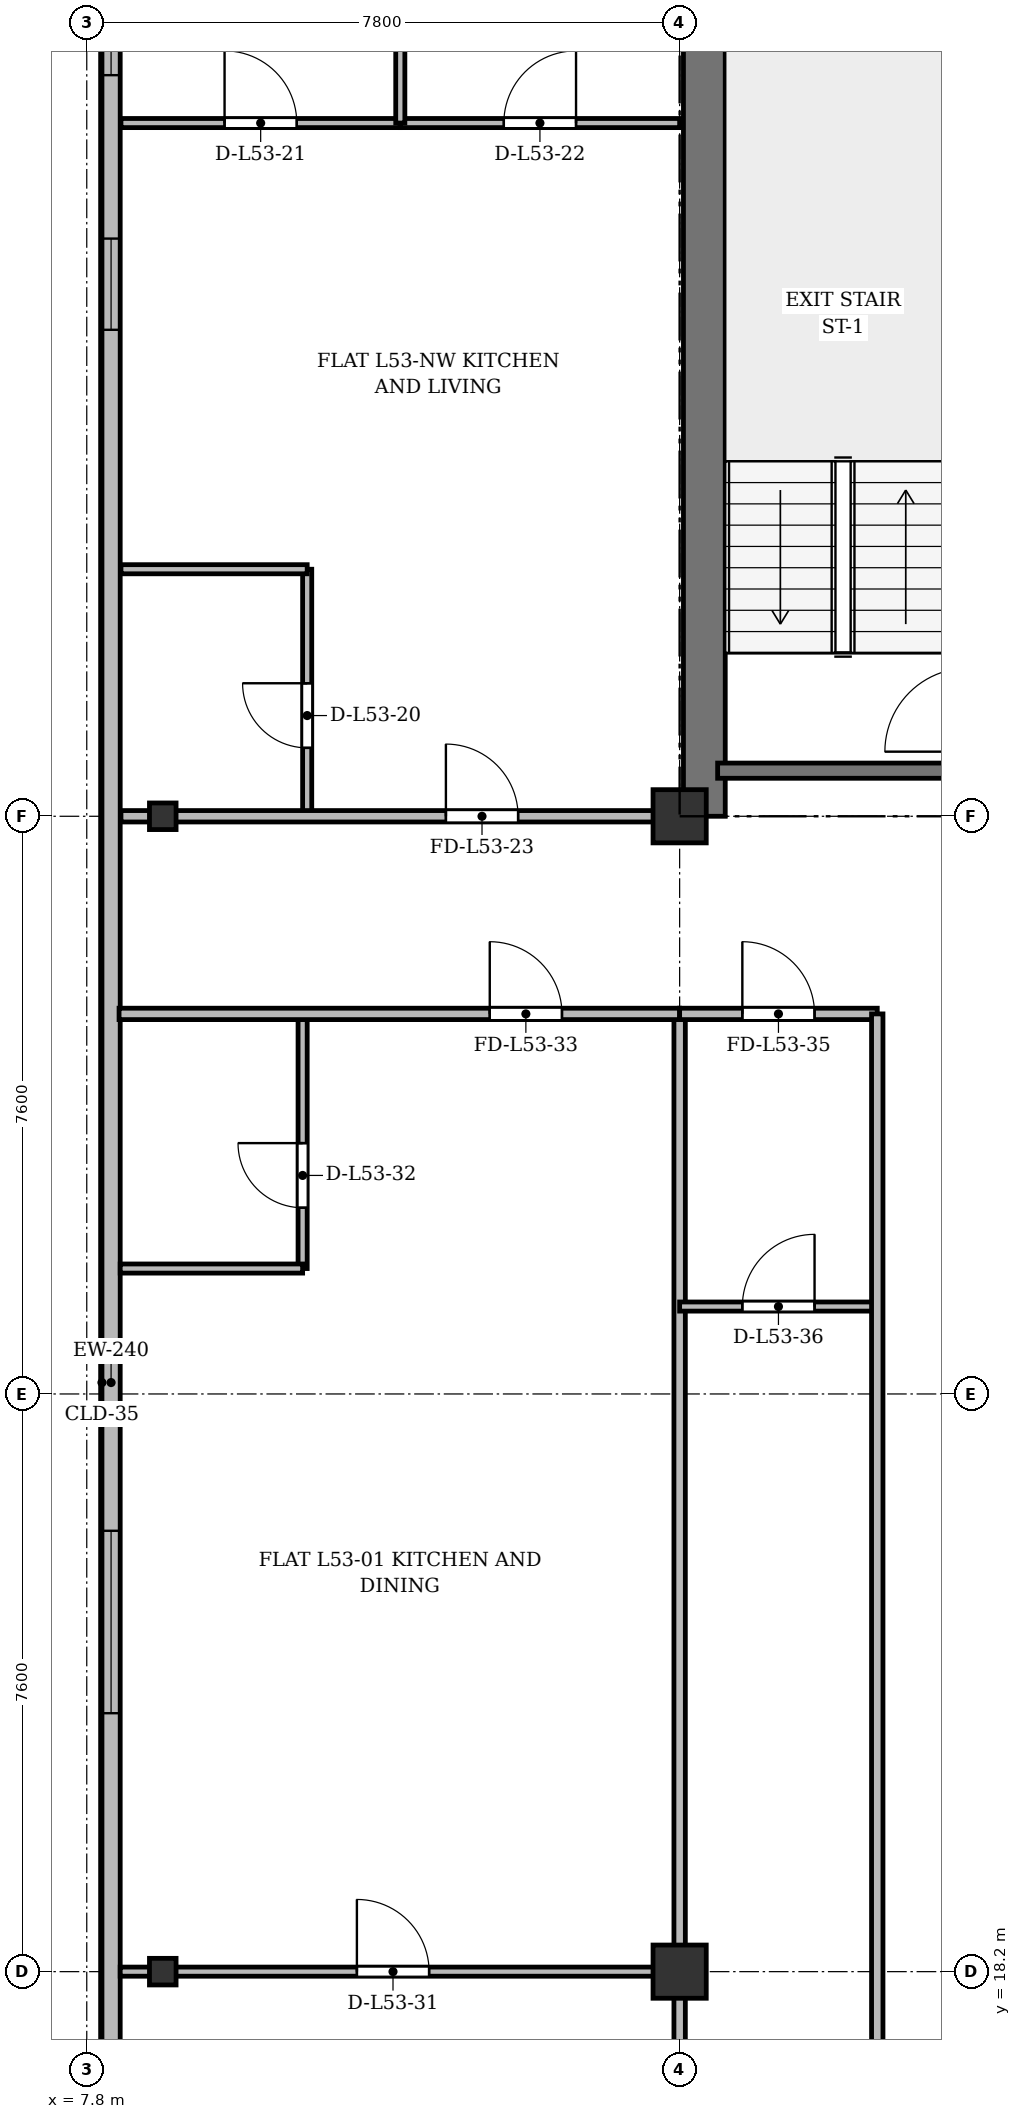
"""IFC4 building model, lengths in metres.
Left out: names, types, materials, properties, quantities, classifications, styles, units other than length and angle.
Written with IfcOpenShell. Run it as: python <this file> out.ifc"""

import sys

from ifc_helpers import new_model, si_unit, direction, frame, frame_2d, origin, origin_2d, place, context, subcontext, project, spatial, rectangle, i_section, extrude, source, transform, mapped, element, fill, save


model = new_model("IFC4")
c1 = context("Model", 3, precision=1e-05, world=origin(), true_north=direction((0.0, 1.0)))
c2 = subcontext(c1, "Body", "Model", "MODEL_VIEW")
j1 = project(units=[si_unit("LENGTHUNIT", "METRE"), si_unit("PLANEANGLEUNIT", "RADIAN")], contexts=[c1])
p1 = place(None, origin())
s1 = spatial("IfcSite", under=j1, at=p1, CompositionType="ELEMENT")
p2 = place(p1, origin())
s2 = spatial("IfcBuilding", under=s1, at=p2, CompositionType="ELEMENT")
p3 = place(p2, frame((0.0, 0.0, 204.9)))
s3 = spatial("IfcBuildingStorey", under=s2, at=p3, CompositionType="ELEMENT", Elevation=204.9)
m1 = source(origin(), c2, "Body", "SweptSolid", [
    extrude(i_section(OverallWidth=0.35, OverallDepth=0.35, WebThickness=0.018, FlangeThickness=0.028, at=origin_2d()), origin(), (0.0, 0.0, 1.0), 3.6),
])
for number, where, z_axis, x_axis in (
    (1, (8.8, 18.2, 0.0), (0.0, 0.0, 1.0), (1.0, 0.0, 0.0)),
    (2, (8.8, 33.4, 0.0), (0.0, 0.0, 1.0), (1.0, 0.0, 0.0)),
):
    element("IfcColumn", number, at=place(p3, frame(where, z_axis=z_axis, x_axis=x_axis)), inside=s3, PredefinedType="COLUMN", context=c2, shape_type="MappedRepresentation", body=[
        mapped(m1, transform((0.0, 0.0, 0.0), x_axis=(1.0, 0.0, 0.0), y_axis=(0.0, 1.0, 0.0), z_axis=(0.0, 0.0, 1.0), scale=1.0)),
    ])
m2 = source(origin(), c2, "Body", "SweptSolid", [
    extrude(rectangle(XDim=0.7, YDim=0.7, at=origin_2d()), origin(), (0.0, 0.0, 1.0), 3.6),
])
for number, where, z_axis, x_axis in (
    (3, (15.6, 18.2, 0.0), (0.0, 0.0, 1.0), (1.0, 0.0, 0.0)),
    (4, (15.6, 33.4, 0.0), (0.0, 0.0, 1.0), (1.0, 0.0, 0.0)),
):
    element("IfcColumn", number, at=place(p3, frame(where, z_axis=z_axis, x_axis=x_axis)), inside=s3, PredefinedType="COLUMN", context=c2, shape_type="MappedRepresentation", body=[
        mapped(m2, transform((0.0, 0.0, 0.0), x_axis=(1.0, 0.0, 0.0), y_axis=(0.0, 1.0, 0.0), z_axis=(0.0, 0.0, 1.0), scale=1.0)),
    ])
p4 = place(p3, frame((8.12, 6.4, 0.0), z_axis=(0.0, 0.0, 1.0), x_axis=(0.0, 1.0, 0.0)))
e5 = element("IfcWall", 5, at=p4, inside=s3, PredefinedType="SOLIDWALL", context=c2, shape_type="SweptSolid", body=[
    extrude(rectangle(XDim=39.1, YDim=0.24, at=frame_2d((19.55, 0.0))), origin(), (0.0, 0.0, 1.0), 3.36),
])
p5 = place(p4, frame((1.45, 0.0, 0.92)))
e6 = element("IfcOpeningElement", 6, at=p5, cuts=e5, PredefinedType="OPENING", context=c2, shape_type="SweptSolid", body=[
    extrude(rectangle(XDim=1.2, YDim=1.65, at=frame_2d((0.6, 0.825))), frame((0.0, 0.13, 0.0), z_axis=(0.0, -1.0, 0.0), x_axis=(1.0, 0.0, 0.0)), (0.0, 0.0, 1.0), 0.26),
])
p6 = place(p4, frame((3.8, 0.0, 0.92)))
e7 = element("IfcOpeningElement", 7, at=p6, cuts=e5, PredefinedType="OPENING", context=c2, shape_type="SweptSolid", body=[
    extrude(rectangle(XDim=2.4, YDim=2.1, at=frame_2d((1.2, 1.05))), frame((0.0, 0.13, 0.0), z_axis=(0.0, -1.0, 0.0), x_axis=(1.0, 0.0, 0.0)), (0.0, 0.0, 1.0), 0.26),
])
p7 = place(p4, frame((8.0, 0.0, 0.92)))
e8 = element("IfcOpeningElement", 8, at=p7, cuts=e5, PredefinedType="OPENING", context=c2, shape_type="SweptSolid", body=[
    extrude(rectangle(XDim=2.4, YDim=2.1, at=frame_2d((1.2, 1.05))), frame((0.0, 0.13, 0.0), z_axis=(0.0, -1.0, 0.0), x_axis=(1.0, 0.0, 0.0)), (0.0, 0.0, 1.0), 0.26),
])
p8 = place(p4, frame((15.2, 0.0, 0.92)))
e9 = element("IfcOpeningElement", 9, at=p8, cuts=e5, PredefinedType="OPENING", context=c2, shape_type="SweptSolid", body=[
    extrude(rectangle(XDim=2.4, YDim=2.1, at=frame_2d((1.2, 1.05))), frame((0.0, 0.13, 0.0), z_axis=(0.0, -1.0, 0.0), x_axis=(1.0, 0.0, 0.0)), (0.0, 0.0, 1.0), 0.26),
])
p9 = place(p4, frame((33.4, 0.0, 0.92)))
e10 = element("IfcOpeningElement", 10, at=p9, cuts=e5, PredefinedType="OPENING", context=c2, shape_type="SweptSolid", body=[
    extrude(rectangle(XDim=1.2, YDim=1.65, at=frame_2d((0.6, 0.825))), frame((0.0, 0.13, 0.0), z_axis=(0.0, -1.0, 0.0), x_axis=(1.0, 0.0, 0.0)), (0.0, 0.0, 1.0), 0.26),
])
p10 = place(p4, frame((36.75, 0.0, 0.92)))
e11 = element("IfcOpeningElement", 11, at=p10, cuts=e5, PredefinedType="OPENING", context=c2, shape_type="SweptSolid", body=[
    extrude(rectangle(XDim=1.2, YDim=1.65, at=frame_2d((0.6, 0.825))), frame((0.0, 0.13, 0.0), z_axis=(0.0, -1.0, 0.0), x_axis=(1.0, 0.0, 0.0)), (0.0, 0.0, 1.0), 0.26),
])
p11 = place(p3, frame((15.925, 33.4, 0.0), z_axis=(0.0, 0.0, 1.0), x_axis=(0.0, 1.0, 0.0)))
e12 = element("IfcWall", 12, at=p11, inside=s3, PredefinedType="SHEAR", context=c2, shape_type="SweptSolid", body=[
    extrude(rectangle(XDim=11.55, YDim=0.55, at=frame_2d((5.775, 0.0))), origin(), (0.0, 0.0, 1.0), 3.36),
])
p12 = place(p3, frame((16.1, 34.0, 0.0), z_axis=(0.0, 0.0, 1.0), x_axis=(1.0, 0.0, 0.0)))
e13 = element("IfcWall", 13, at=p12, inside=s3, PredefinedType="SHEAR", context=c2, shape_type="SweptSolid", body=[
    extrude(rectangle(XDim=3.4, YDim=0.2, at=frame_2d((1.7, 0.0))), origin(), (0.0, 0.0, 1.0), 3.36),
])
p13 = place(p3, frame((10.7, 33.4, 0.0), z_axis=(0.0, 0.0, 1.0), x_axis=(0.0, 1.0, 0.0)))
e14 = element("IfcWall", 14, at=p13, inside=s3, PredefinedType="PARTITIONING", context=c2, shape_type="SweptSolid", body=[
    extrude(rectangle(XDim=3.25, YDim=0.12, at=frame_2d((1.625, 0.0))), origin(), (0.0, 0.0, 1.0), 2.91),
])
p14 = place(p13, frame((0.9, 0.0, 0.0)))
e15 = element("IfcOpeningElement", 15, at=p14, cuts=e14, PredefinedType="OPENING", context=c2, shape_type="SweptSolid", body=[
    extrude(rectangle(XDim=0.85, YDim=2.1, at=frame_2d((0.425, 1.05))), frame((0.0, 0.07, 0.0), z_axis=(0.0, -1.0, 0.0), x_axis=(1.0, 0.0, 0.0)), (0.0, 0.0, 1.0), 0.14),
])
p15 = place(p3, frame((8.25, 36.65, 0.0), z_axis=(0.0, 0.0, 1.0), x_axis=(1.0, 0.0, 0.0)))
e16 = element("IfcWall", 16, at=p15, inside=s3, PredefinedType="PARTITIONING", context=c2, shape_type="SweptSolid", body=[
    extrude(rectangle(XDim=2.45, YDim=0.12, at=frame_2d((1.225, 0.0))), origin(), (0.0, 0.0, 1.0), 2.86),
])
p16 = place(p3, frame((8.25, 42.52, 0.0), z_axis=(0.0, 0.0, 1.0), x_axis=(1.0, 0.0, 0.0)))
e17 = element("IfcWall", 17, at=p16, inside=s3, PredefinedType="PARTITIONING", context=c2, shape_type="SweptSolid", body=[
    extrude(rectangle(XDim=3.675, YDim=0.12, at=frame_2d((1.837, 0.0))), origin(), (0.0, 0.0, 1.0), 2.86),
])
p17 = place(p16, frame((1.363, 0.0, 0.0)))
e18 = element("IfcOpeningElement", 18, at=p17, cuts=e17, PredefinedType="OPENING", context=c2, shape_type="SweptSolid", body=[
    extrude(rectangle(XDim=0.95, YDim=2.15, at=frame_2d((0.475, 1.075))), frame((0.0, 0.07, 0.0), z_axis=(0.0, -1.0, 0.0), x_axis=(1.0, 0.0, 0.0)), (0.0, 0.0, 1.0), 0.14),
])
p18 = place(p3, frame((11.925, 42.52, 0.0), z_axis=(0.0, 0.0, 1.0), x_axis=(1.0, 0.0, 0.0)))
e19 = element("IfcWall", 19, at=p18, inside=s3, PredefinedType="PARTITIONING", context=c2, shape_type="SweptSolid", body=[
    extrude(rectangle(XDim=3.675, YDim=0.12, at=frame_2d((1.837, 0.0))), origin(), (0.0, 0.0, 1.0), 2.86),
])
p19 = place(p18, frame((1.362, 0.0, 0.0)))
e20 = element("IfcOpeningElement", 20, at=p19, cuts=e19, PredefinedType="OPENING", context=c2, shape_type="SweptSolid", body=[
    extrude(rectangle(XDim=0.95, YDim=2.15, at=frame_2d((0.475, 1.075))), frame((0.0, 0.07, 0.0), z_axis=(0.0, -1.0, 0.0), x_axis=(1.0, 0.0, 0.0)), (0.0, 0.0, 1.0), 0.14),
])
p20 = place(p3, frame((11.925, 42.52, 0.0), z_axis=(0.0, 0.0, 1.0), x_axis=(0.0, 1.0, 0.0)))
e21 = element("IfcWall", 21, at=p20, inside=s3, PredefinedType="PARTITIONING", context=c2, shape_type="SweptSolid", body=[
    extrude(rectangle(XDim=5.74, YDim=0.12, at=frame_2d((2.87, 0.0))), origin(), (0.0, 0.0, 1.0), 2.91),
])
p21 = place(p3, frame((8.25, 33.4, 0.0), z_axis=(0.0, 0.0, 1.0), x_axis=(1.0, 0.0, 0.0)))
e22 = element("IfcWall", 22, at=p21, inside=s3, PredefinedType="PARTITIONING", context=c2, shape_type="SweptSolid", body=[
    extrude(rectangle(XDim=7.35, YDim=0.15, at=frame_2d((3.675, 0.0))), origin(), (0.0, 0.0, 1.0), 2.91),
])
p22 = place(p21, frame((4.275, 0.0, 0.0)))
e23 = element("IfcOpeningElement", 23, at=p22, cuts=e22, PredefinedType="OPENING", context=c2, shape_type="SweptSolid", body=[
    extrude(rectangle(XDim=0.95, YDim=2.15, at=frame_2d((0.475, 1.075))), frame((0.0, 0.085, 0.0), z_axis=(0.0, -1.0, 0.0), x_axis=(1.0, 0.0, 0.0)), (0.0, 0.0, 1.0), 0.17),
])
p23 = place(p3, frame((15.6, 3.625, 0.0), z_axis=(0.0, 0.0, 1.0), x_axis=(0.0, 1.0, 0.0)))
e24 = element("IfcWall", 24, at=p23, inside=s3, PredefinedType="PARTITIONING", context=c2, shape_type="SweptSolid", body=[
    extrude(rectangle(XDim=27.175, YDim=0.15, at=frame_2d((13.587, 0.0))), origin(), (0.0, 0.0, 1.0), 2.86),
])
p24 = place(p3, frame((8.24, 18.2, 0.0), z_axis=(0.0, 0.0, 1.0), x_axis=(1.0, 0.0, 0.0)))
e25 = element("IfcWall", 25, at=p24, inside=s3, PredefinedType="PARTITIONING", context=c2, shape_type="SweptSolid", body=[
    extrude(rectangle(XDim=7.36, YDim=0.12, at=frame_2d((3.68, 0.0))), origin(), (0.0, 0.0, 1.0), 2.91),
])
p25 = place(p24, frame((3.114, 0.0, 0.0)))
e26 = element("IfcOpeningElement", 26, at=p25, cuts=e25, PredefinedType="OPENING", context=c2, shape_type="SweptSolid", body=[
    extrude(rectangle(XDim=0.95, YDim=2.15, at=frame_2d((0.475, 1.075))), frame((0.0, 0.07, 0.0), z_axis=(0.0, -1.0, 0.0), x_axis=(1.0, 0.0, 0.0)), (0.0, 0.0, 1.0), 0.14),
])
p26 = place(p3, frame((10.64, 27.45, 0.0), z_axis=(0.0, 0.0, 1.0), x_axis=(0.0, 1.0, 0.0)))
e27 = element("IfcWall", 27, at=p26, inside=s3, PredefinedType="PARTITIONING", context=c2, shape_type="SweptSolid", body=[
    extrude(rectangle(XDim=3.35, YDim=0.12, at=frame_2d((1.675, 0.0))), origin(), (0.0, 0.0, 1.0), 3.36),
])
p27 = place(p26, frame((0.8, 0.0, 0.0)))
e28 = element("IfcOpeningElement", 28, at=p27, cuts=e27, PredefinedType="OPENING", context=c2, shape_type="SweptSolid", body=[
    extrude(rectangle(XDim=0.85, YDim=2.1, at=frame_2d((0.425, 1.05))), frame((0.0, 0.07, 0.0), z_axis=(0.0, -1.0, 0.0), x_axis=(1.0, 0.0, 0.0)), (0.0, 0.0, 1.0), 0.14),
])
p28 = place(p3, frame((8.24, 27.45, 0.0), z_axis=(0.0, 0.0, 1.0), x_axis=(1.0, 0.0, 0.0)))
e29 = element("IfcWall", 29, at=p28, inside=s3, PredefinedType="PARTITIONING", context=c2, shape_type="SweptSolid", body=[
    extrude(rectangle(XDim=2.4, YDim=0.12, at=frame_2d((1.2, 0.0))), origin(), (0.0, 0.0, 1.0), 2.86),
])
p29 = place(p3, frame((8.225, 30.8, 0.0), z_axis=(0.0, 0.0, 1.0), x_axis=(1.0, 0.0, 0.0)))
e30 = element("IfcWall", 30, at=p29, inside=s3, PredefinedType="PARTITIONING", context=c2, shape_type="SweptSolid", body=[
    extrude(rectangle(XDim=7.375, YDim=0.15, at=frame_2d((3.688, 0.0))), origin(), (0.0, 0.0, 1.0), 2.86),
])
p30 = place(p29, frame((4.877, 0.0, 0.0)))
e31 = element("IfcOpeningElement", 31, at=p30, cuts=e30, PredefinedType="OPENING", context=c2, shape_type="SweptSolid", body=[
    extrude(rectangle(XDim=0.95, YDim=2.15, at=frame_2d((0.475, 1.075))), frame((0.0, 0.085, 0.0), z_axis=(0.0, -1.0, 0.0), x_axis=(1.0, 0.0, 0.0)), (0.0, 0.0, 1.0), 0.17),
])
p31 = place(p3, frame((15.6, 30.8, 0.0), z_axis=(0.0, 0.0, 1.0), x_axis=(1.0, 0.0, 0.0)))
e32 = element("IfcWall", 32, at=p31, inside=s3, PredefinedType="PARTITIONING", context=c2, shape_type="SweptSolid", body=[
    extrude(rectangle(XDim=2.6, YDim=0.15, at=frame_2d((1.3, 0.0))), origin(), (0.0, 0.0, 1.0), 2.86),
])
p32 = place(p31, frame((0.825, 0.0, 0.0)))
e33 = element("IfcOpeningElement", 33, at=p32, cuts=e32, PredefinedType="OPENING", context=c2, shape_type="SweptSolid", body=[
    extrude(rectangle(XDim=0.95, YDim=2.15, at=frame_2d((0.475, 1.075))), frame((0.0, 0.085, 0.0), z_axis=(0.0, -1.0, 0.0), x_axis=(1.0, 0.0, 0.0)), (0.0, 0.0, 1.0), 0.17),
])
p33 = place(p3, frame((15.6, 26.95, 0.0), z_axis=(0.0, 0.0, 1.0), x_axis=(1.0, 0.0, 0.0)))
e34 = element("IfcWall", 34, at=p33, inside=s3, PredefinedType="PARTITIONING", context=c2, shape_type="SweptSolid", body=[
    extrude(rectangle(XDim=2.6, YDim=0.12, at=frame_2d((1.3, 0.0))), origin(), (0.0, 0.0, 1.0), 2.86),
])
p34 = place(p33, frame((0.825, 0.0, 0.0)))
e35 = element("IfcOpeningElement", 35, at=p34, cuts=e34, PredefinedType="OPENING", context=c2, shape_type="SweptSolid", body=[
    extrude(rectangle(XDim=0.95, YDim=2.15, at=frame_2d((0.475, 1.075))), frame((0.0, 0.07, 0.0), z_axis=(0.0, -1.0, 0.0), x_axis=(1.0, 0.0, 0.0)), (0.0, 0.0, 1.0), 0.14),
])
p35 = place(p3, frame((18.2, 3.625, 0.0), z_axis=(0.0, 0.0, 1.0), x_axis=(0.0, 1.0, 0.0)))
e36 = element("IfcWall", 36, at=p35, inside=s3, PredefinedType="PARTITIONING", context=c2, shape_type="SweptSolid", body=[
    extrude(rectangle(XDim=27.175, YDim=0.15, at=frame_2d((13.587, 0.0))), origin(), (0.0, 0.0, 1.0), 2.91),
])
m3 = source(origin(), c2, "Body", "SweptSolid", [
    extrude(rectangle(XDim=2.4, YDim=2.1, at=frame_2d((1.2, 1.05))), frame((0.0, 0.03, 0.0), z_axis=(0.0, -1.0, 0.0), x_axis=(1.0, 0.0, 0.0)), (0.0, 0.0, 1.0), 0.06),
])
p36 = place(p8, origin())
e37 = element("IfcWindow", 37, at=p36, inside=s3, PartitioningType="SINGLE_PANEL", PredefinedType="WINDOW", context=c2, shape_type="MappedRepresentation", body=[
    mapped(m3, transform((0.0, 0.0, 0.0), x_axis=(1.0, 0.0, 0.0), y_axis=(0.0, 1.0, 0.0), z_axis=(0.0, 0.0, 1.0), scale=1.0)),
])
fill(e9, e37)
m4 = source(origin(), c2, "Body", "SweptSolid", [
    extrude(rectangle(XDim=1.2, YDim=1.65, at=frame_2d((0.6, 0.825))), frame((0.0, 0.03, 0.0), z_axis=(0.0, -1.0, 0.0), x_axis=(1.0, 0.0, 0.0)), (0.0, 0.0, 1.0), 0.06),
])
p37 = place(p9, origin())
e38 = element("IfcWindow", 38, at=p37, inside=s3, PartitioningType="SINGLE_PANEL", PredefinedType="WINDOW", context=c2, shape_type="MappedRepresentation", body=[
    mapped(m4, transform((0.0, 0.0, 0.0), x_axis=(1.0, 0.0, 0.0), y_axis=(0.0, 1.0, 0.0), z_axis=(0.0, 0.0, 1.0), scale=1.0)),
])
fill(e10, e38)
p38 = place(p10, origin())
e39 = element("IfcWindow", 39, at=p38, inside=s3, PartitioningType="SINGLE_PANEL", PredefinedType="WINDOW", context=c2, shape_type="MappedRepresentation", body=[
    mapped(m4, transform((0.0, 0.0, 0.0), x_axis=(1.0, 0.0, 0.0), y_axis=(0.0, 1.0, 0.0), z_axis=(0.0, 0.0, 1.0), scale=1.0)),
])
fill(e11, e39)
m5 = source(origin(), c2, "Body", "SweptSolid", [
    extrude(rectangle(XDim=0.85, YDim=2.1, at=frame_2d((0.425, 1.05))), frame((0.0, 0.025, 0.0), z_axis=(0.0, -1.0, 0.0), x_axis=(1.0, 0.0, 0.0)), (0.0, 0.0, 1.0), 0.05),
])
p39 = place(p14, origin())
e40 = element("IfcDoor", 40, at=p39, inside=s3, OperationType="SINGLE_SWING_RIGHT", PredefinedType="DOOR", context=c2, shape_type="MappedRepresentation", body=[
    mapped(m5, transform((0.0, 0.0, 0.0), x_axis=(1.0, 0.0, 0.0), y_axis=(0.0, 1.0, 0.0), z_axis=(0.0, 0.0, 1.0), scale=1.0)),
])
fill(e15, e40)
m6 = source(origin(), c2, "Body", "SweptSolid", [
    extrude(rectangle(XDim=0.95, YDim=2.15, at=frame_2d((0.475, 1.075))), frame((0.0, 0.025, 0.0), z_axis=(0.0, -1.0, 0.0), x_axis=(1.0, 0.0, 0.0)), (0.0, 0.0, 1.0), 0.05),
])
p40 = place(p17, origin())
e41 = element("IfcDoor", 41, at=p40, inside=s3, OperationType="SINGLE_SWING_LEFT", PredefinedType="DOOR", context=c2, shape_type="MappedRepresentation", body=[
    mapped(m6, transform((0.0, 0.0, 0.0), x_axis=(1.0, 0.0, 0.0), y_axis=(0.0, 1.0, 0.0), z_axis=(0.0, 0.0, 1.0), scale=1.0)),
])
fill(e18, e41)
p41 = place(p19, origin())
e42 = element("IfcDoor", 42, at=p41, inside=s3, OperationType="SINGLE_SWING_RIGHT", PredefinedType="DOOR", context=c2, shape_type="MappedRepresentation", body=[
    mapped(m6, transform((0.0, 0.0, 0.0), x_axis=(1.0, 0.0, 0.0), y_axis=(0.0, 1.0, 0.0), z_axis=(0.0, 0.0, 1.0), scale=1.0)),
])
fill(e20, e42)
p42 = place(p22, origin())
e43 = element("IfcDoor", 43, at=p42, inside=s3, OperationType="SINGLE_SWING_LEFT", PredefinedType="DOOR", context=c2, shape_type="MappedRepresentation", body=[
    mapped(m6, transform((0.0, 0.0, 0.0), x_axis=(1.0, 0.0, 0.0), y_axis=(0.0, 1.0, 0.0), z_axis=(0.0, 0.0, 1.0), scale=1.0)),
])
fill(e23, e43)
p43 = place(p25, origin())
e44 = element("IfcDoor", 44, at=p43, inside=s3, OperationType="SINGLE_SWING_LEFT", PredefinedType="DOOR", context=c2, shape_type="MappedRepresentation", body=[
    mapped(m6, transform((0.0, 0.0, 0.0), x_axis=(1.0, 0.0, 0.0), y_axis=(0.0, 1.0, 0.0), z_axis=(0.0, 0.0, 1.0), scale=1.0)),
])
fill(e26, e44)
p44 = place(p27, origin())
e45 = element("IfcDoor", 45, at=p44, inside=s3, OperationType="SINGLE_SWING_RIGHT", PredefinedType="DOOR", context=c2, shape_type="MappedRepresentation", body=[
    mapped(m5, transform((0.0, 0.0, 0.0), x_axis=(1.0, 0.0, 0.0), y_axis=(0.0, 1.0, 0.0), z_axis=(0.0, 0.0, 1.0), scale=1.0)),
])
fill(e28, e45)
p45 = place(p30, origin())
e46 = element("IfcDoor", 46, at=p45, inside=s3, OperationType="SINGLE_SWING_LEFT", PredefinedType="DOOR", context=c2, shape_type="MappedRepresentation", body=[
    mapped(m6, transform((0.0, 0.0, 0.0), x_axis=(1.0, 0.0, 0.0), y_axis=(0.0, 1.0, 0.0), z_axis=(0.0, 0.0, 1.0), scale=1.0)),
])
fill(e31, e46)
p46 = place(p32, origin())
e47 = element("IfcDoor", 47, at=p46, inside=s3, OperationType="SINGLE_SWING_LEFT", PredefinedType="DOOR", context=c2, shape_type="MappedRepresentation", body=[
    mapped(m6, transform((0.0, 0.0, 0.0), x_axis=(1.0, 0.0, 0.0), y_axis=(0.0, 1.0, 0.0), z_axis=(0.0, 0.0, 1.0), scale=1.0)),
])
fill(e33, e47)
p47 = place(p34, origin())
e48 = element("IfcDoor", 48, at=p47, inside=s3, OperationType="SINGLE_SWING_RIGHT", PredefinedType="DOOR", context=c2, shape_type="MappedRepresentation", body=[
    mapped(m6, transform((0.0, 0.0, 0.0), x_axis=(1.0, 0.0, 0.0), y_axis=(0.0, 1.0, 0.0), z_axis=(0.0, 0.0, 1.0), scale=1.0)),
])
fill(e35, e48)
save(model, sys.argv[1])
